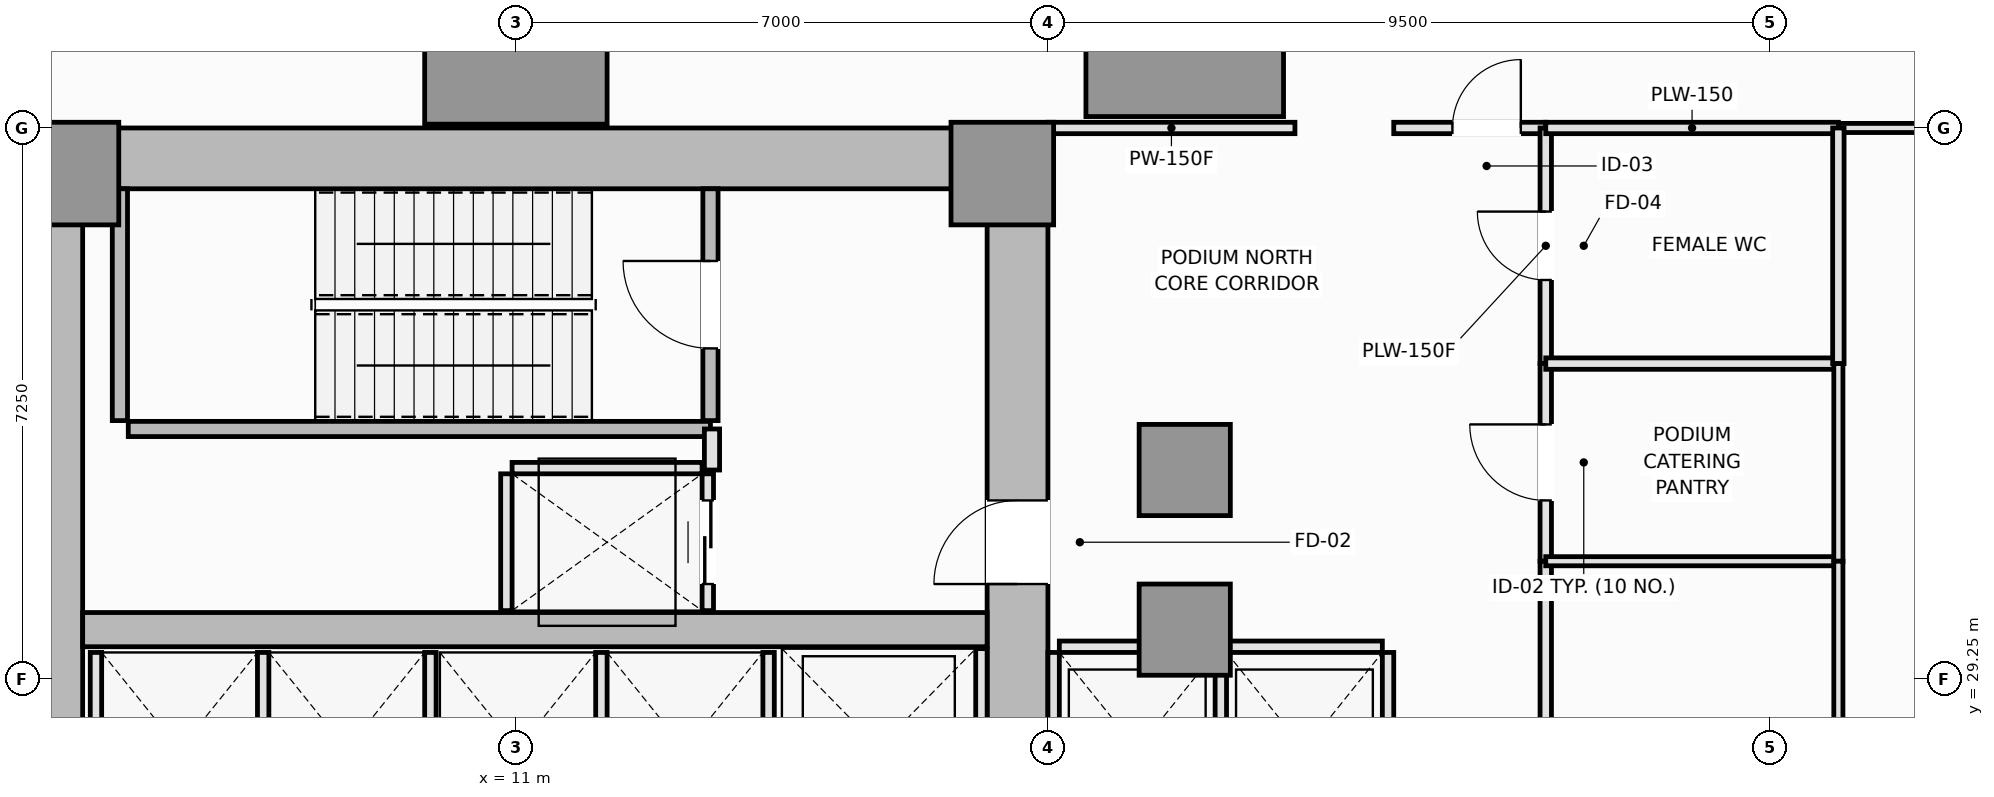
"""IFC4 building model, lengths in metres.
Left out: names, types, materials, properties, quantities, classifications, styles, units other than length and angle.
Written with IfcOpenShell. Run it as: python <this file> out.ifc"""

import sys

from ifc_helpers import new_model, si_unit, direction, frame, frame_2d, origin, origin_2d, place, context, subcontext, project, spatial, rectangle, extrude, element, fill, save


model = new_model("IFC4")
c1 = context("Model", 3, precision=1e-05, world=origin(), true_north=direction((0.0, 1.0)))
c2 = subcontext(c1, "Body", "Model", "MODEL_VIEW")
j1 = project(units=[si_unit("LENGTHUNIT", "METRE"), si_unit("PLANEANGLEUNIT", "RADIAN")], contexts=[c1])
p1 = place(None, origin())
s1 = spatial("IfcSite", under=j1, at=p1, CompositionType="ELEMENT")
p2 = place(p1, origin())
s2 = spatial("IfcBuilding", under=s1, at=p2, CompositionType="ELEMENT")
p3 = place(p2, frame((0.0, 0.0, 6.0)))
s3 = spatial("IfcBuildingStorey", under=s2, at=p3, CompositionType="ELEMENT", Elevation=6.0)
p4 = place(p3, frame((4.5, 36.1, 0.0), z_axis=(0.0, 0.0, 1.0), x_axis=(1.0, 0.0, 0.0)))
e1 = element("IfcWall", 1, at=p4, inside=s3, PredefinedType="SHEAR", context=c2, shape_type="SweptSolid", body=[
    extrude(rectangle(XDim=13.5, YDim=0.8, at=frame_2d((6.75, 0.0))), origin(), (0.0, 0.0, 1.0), 4.8),
])
p5 = place(p3, frame((4.9, 14.8, 0.0), z_axis=(0.0, 0.0, 1.0), x_axis=(0.0, 1.0, 0.0)))
e2 = element("IfcWall", 2, at=p5, inside=s3, PredefinedType="SHEAR", context=c2, shape_type="SweptSolid", body=[
    extrude(rectangle(XDim=20.9, YDim=0.8, at=frame_2d((10.45, 0.0))), origin(), (0.0, 0.0, 1.0), 4.8),
])
p6 = place(p3, frame((17.6, 27.05, 0.0), z_axis=(0.0, 0.0, 1.0), x_axis=(0.0, 1.0, 0.0)))
e3 = element("IfcWall", 3, at=p6, inside=s3, PredefinedType="SHEAR", context=c2, shape_type="SweptSolid", body=[
    extrude(rectangle(XDim=8.65, YDim=0.8, at=frame_2d((4.325, 0.0))), origin(), (0.0, 0.0, 1.0), 4.8),
])
p7 = place(p6, frame((3.45, 0.0, 0.0)))
e4 = element("IfcOpeningElement", 4, at=p7, cuts=e3, PredefinedType="OPENING", context=c2, shape_type="SweptSolid", body=[
    extrude(rectangle(XDim=1.1, YDim=2.15, at=frame_2d((0.55, 1.075))), frame((0.0, 0.41, 0.0), z_axis=(0.0, -1.0, 0.0), x_axis=(1.0, 0.0, 0.0)), (0.0, 0.0, 1.0), 0.82),
])
p8 = place(p3, frame((5.3, 29.9, 0.0), z_axis=(0.0, 0.0, 1.0), x_axis=(1.0, 0.0, 0.0)))
e5 = element("IfcWall", 5, at=p8, inside=s3, PredefinedType="SHEAR", context=c2, shape_type="SweptSolid", body=[
    extrude(rectangle(XDim=11.9, YDim=0.45, at=frame_2d((5.95, 0.0))), origin(), (0.0, 0.0, 1.0), 4.8),
])
for number, where, z_axis, x_axis in (
    (6, (5.1, 35.9, 0.0), (0.0, 0.0, 1.0), (1.0, 0.0, 0.0)),
    (7, (17.4, 35.9, 0.0), (0.0, 0.0, 1.0), (1.0, 0.0, 0.0)),
):
    element("IfcColumn", number, at=place(p3, frame(where, z_axis=z_axis, x_axis=x_axis)), inside=s3, PredefinedType="PILASTER", context=c2, shape_type="SweptSolid", body=[
        extrude(rectangle(XDim=1.35, YDim=1.35, at=origin_2d()), origin(), (0.0, 0.0, 1.0), 4.8),
    ])
p9 = place(p3, frame((11.0, 37.75, 0.0), z_axis=(0.0, 0.0, 1.0), x_axis=(1.0, 0.0, 0.0)))
e8 = element("IfcColumn", 8, at=p9, inside=s3, PredefinedType="COLUMN", context=c2, shape_type="SweptSolid", body=[
    extrude(rectangle(XDim=2.4, YDim=2.4, at=origin_2d()), origin(), (0.0, 0.0, 1.0), 4.8),
])
p10 = place(p3, frame((19.8, 37.75, 0.0), z_axis=(0.0, 0.0, 1.0), x_axis=(1.0, 0.0, 0.0)))
e9 = element("IfcColumn", 9, at=p10, inside=s3, PredefinedType="COLUMN", context=c2, shape_type="SweptSolid", body=[
    extrude(rectangle(XDim=2.6, YDim=2.2, at=origin_2d()), origin(), (0.0, 0.0, 1.0), 4.8),
])
for number, where, z_axis, x_axis in (
    (10, (19.8, 29.9, 0.0), (0.0, 0.0, 1.0), (1.0, 0.0, 0.0)),
    (11, (19.8, 32.0, 0.0), (0.0, 0.0, 1.0), (1.0, 0.0, 0.0)),
):
    element("IfcColumn", number, at=place(p3, frame(where, z_axis=z_axis, x_axis=x_axis)), inside=s3, PredefinedType="COLUMN", context=c2, shape_type="SweptSolid", body=[
        extrude(rectangle(XDim=1.2, YDim=1.2, at=origin_2d()), origin(), (0.0, 0.0, 1.0), 4.8),
    ])
p11 = place(p3, frame((5.79, 32.65, 0.0), z_axis=(0.0, 0.0, 1.0), x_axis=(0.0, 1.0, 0.0)))
e12 = element("IfcWall", 12, at=p11, inside=s3, PredefinedType="SOLIDWALL", context=c2, shape_type="SweptSolid", body=[
    extrude(rectangle(XDim=3.05, YDim=0.2, at=frame_2d((1.525, 0.0))), origin(), (0.0, 0.0, 1.0), 4.8),
])
p12 = place(p3, frame((5.9, 32.54, 0.0), z_axis=(0.0, 0.0, 1.0), x_axis=(1.0, 0.0, 0.0)))
e13 = element("IfcWall", 13, at=p12, inside=s3, PredefinedType="SOLIDWALL", context=c2, shape_type="SweptSolid", body=[
    extrude(rectangle(XDim=7.66, YDim=0.2, at=frame_2d((3.83, 0.0))), origin(), (0.0, 0.0, 1.0), 4.8),
])
p13 = place(p3, frame((13.56, 32.65, 0.0), z_axis=(0.0, 0.0, 1.0), x_axis=(0.0, 1.0, 0.0)))
e14 = element("IfcWall", 14, at=p13, inside=s3, PredefinedType="SOLIDWALL", context=c2, shape_type="SweptSolid", body=[
    extrude(rectangle(XDim=3.05, YDim=0.2, at=frame_2d((1.525, 0.0))), origin(), (0.0, 0.0, 1.0), 4.8),
])
p14 = place(p13, frame((0.95, 0.0, 0.0)))
e15 = element("IfcOpeningElement", 15, at=p14, cuts=e14, PredefinedType="OPENING", context=c2, shape_type="SweptSolid", body=[
    extrude(rectangle(XDim=1.15, YDim=2.15, at=frame_2d((0.575, 1.075))), frame((0.0, 0.11, 0.0), z_axis=(0.0, -1.0, 0.0), x_axis=(1.0, 0.0, 0.0)), (0.0, 0.0, 1.0), 0.22),
])
p15 = place(p3, frame((18.15, 29.675, 0.0), z_axis=(0.0, 0.0, 1.0), x_axis=(1.0, 0.0, 0.0)))
e16 = element("IfcWall", 16, at=p15, inside=s3, PredefinedType="PARTITIONING", context=c2, shape_type="SweptSolid", body=[
    extrude(rectangle(XDim=2.05, YDim=0.15, at=frame_2d((1.025, 0.0))), origin(), (0.0, 0.0, 1.0), 4.6),
])
for number, where, z_axis, x_axis in (
    (17, (18.075, 27.05, 0.0), (0.0, 0.0, 1.0), (0.0, 1.0, 0.0)),
    (18, (20.275, 27.05, 0.0), (0.0, 0.0, 1.0), (0.0, 1.0, 0.0)),
):
    element("IfcWall", number, at=place(p3, frame(where, z_axis=z_axis, x_axis=x_axis)), inside=s3, PredefinedType="PARTITIONING", context=c2, shape_type="SweptSolid", body=[
        extrude(rectangle(XDim=2.55, YDim=0.15, at=frame_2d((1.275, 0.0))), origin(), (0.0, 0.0, 1.0), 4.6),
    ])
p16 = place(p3, frame((20.35, 29.675, 0.0), z_axis=(0.0, 0.0, 1.0), x_axis=(1.0, 0.0, 0.0)))
e19 = element("IfcWall", 19, at=p16, inside=s3, PredefinedType="PARTITIONING", context=c2, shape_type="SweptSolid", body=[
    extrude(rectangle(XDim=2.05, YDim=0.15, at=frame_2d((1.025, 0.0))), origin(), (0.0, 0.0, 1.0), 4.6),
])
for number, where, z_axis, x_axis in (
    (20, (22.475, 27.05, 0.0), (0.0, 0.0, 1.0), (0.0, 1.0, 0.0)),
    (21, (5.475, 27.05, 0.0), (0.0, 0.0, 1.0), (0.0, 1.0, 0.0)),
    (22, (7.675, 27.05, 0.0), (0.0, 0.0, 1.0), (0.0, 1.0, 0.0)),
    (23, (9.875, 27.05, 0.0), (0.0, 0.0, 1.0), (0.0, 1.0, 0.0)),
    (24, (12.125, 27.05, 0.0), (0.0, 0.0, 1.0), (0.0, 1.0, 0.0)),
    (25, (14.325, 27.05, 0.0), (0.0, 0.0, 1.0), (0.0, 1.0, 0.0)),
):
    element("IfcWall", number, at=place(p3, frame(where, z_axis=z_axis, x_axis=x_axis)), inside=s3, PredefinedType="PARTITIONING", context=c2, shape_type="SweptSolid", body=[
        extrude(rectangle(XDim=2.55, YDim=0.15, at=frame_2d((1.275, 0.0))), origin(), (0.0, 0.0, 1.0), 4.6),
    ])
p17 = place(p3, frame((17.125, 27.05, 0.0), z_axis=(0.0, 0.0, 1.0), x_axis=(0.0, 1.0, 0.0)))
e26 = element("IfcWall", 26, at=p17, inside=s3, PredefinedType="PARTITIONING", context=c2, shape_type="SweptSolid", body=[
    extrude(rectangle(XDim=2.6, YDim=0.15, at=frame_2d((1.3, 0.0))), origin(), (0.0, 0.0, 1.0), 4.6),
])
p18 = place(p3, frame((10.95, 32.025, 0.0), z_axis=(0.0, 0.0, 1.0), x_axis=(1.0, 0.0, 0.0)))
e27 = element("IfcWall", 27, at=p18, inside=s3, PredefinedType="PARTITIONING", context=c2, shape_type="SweptSolid", body=[
    extrude(rectangle(XDim=2.5, YDim=0.15, at=frame_2d((1.25, 0.0))), origin(), (0.0, 0.0, 1.0), 4.6),
])
p19 = place(p3, frame((10.875, 30.15, 0.0), z_axis=(0.0, 0.0, 1.0), x_axis=(0.0, 1.0, 0.0)))
e28 = element("IfcWall", 28, at=p19, inside=s3, PredefinedType="PARTITIONING", context=c2, shape_type="SweptSolid", body=[
    extrude(rectangle(XDim=1.8, YDim=0.15, at=frame_2d((0.9, 0.0))), origin(), (0.0, 0.0, 1.0), 4.6),
])
p20 = place(p3, frame((13.525, 30.15, 0.0), z_axis=(0.0, 0.0, 1.0), x_axis=(0.0, 1.0, 0.0)))
e29 = element("IfcWall", 29, at=p20, inside=s3, PredefinedType="PARTITIONING", context=c2, shape_type="SweptSolid", body=[
    extrude(rectangle(XDim=1.8, YDim=0.15, at=frame_2d((0.9, 0.0))), origin(), (0.0, 0.0, 1.0), 4.6),
])
p21 = place(p20, frame((0.35, 0.0, 0.0)))
e30 = element("IfcOpeningElement", 30, at=p21, cuts=e29, PredefinedType="OPENING", context=c2, shape_type="SweptSolid", body=[
    extrude(rectangle(XDim=1.1, YDim=2.2, at=frame_2d((0.55, 1.1))), frame((0.0, 0.085, 0.0), z_axis=(0.0, -1.0, 0.0), x_axis=(1.0, 0.0, 0.0)), (0.0, 0.0, 1.0), 0.17),
])
p22 = place(p3, frame((13.58, 32.0, 0.0), z_axis=(0.0, 0.0, 1.0), x_axis=(0.0, 1.0, 0.0)))
e31 = element("IfcWall", 31, at=p22, inside=s3, PredefinedType="PARTITIONING", context=c2, shape_type="SweptSolid", body=[
    extrude(rectangle(XDim=0.54, YDim=0.2, at=frame_2d((0.27, 0.0))), origin(), (0.0, 0.0, 1.0), 4.6),
])
p23 = place(p3, frame((18.0, 36.5, 0.0), z_axis=(0.0, 0.0, 1.0), x_axis=(1.0, 0.0, 0.0)))
e32 = element("IfcWall", 32, at=p23, inside=s3, PredefinedType="PARTITIONING", context=c2, shape_type="SweptSolid", body=[
    extrude(rectangle(XDim=3.25, YDim=0.15, at=frame_2d((1.625, 0.0))), origin(), (0.0, 0.0, 1.0), 4.6),
])
p24 = place(p3, frame((22.55, 36.5, 0.0), z_axis=(0.0, 0.0, 1.0), x_axis=(1.0, 0.0, 0.0)))
e33 = element("IfcWall", 33, at=p24, inside=s3, PredefinedType="PARTITIONING", context=c2, shape_type="SweptSolid", body=[
    extrude(rectangle(XDim=2.0, YDim=0.15, at=frame_2d((1.0, 0.0))), origin(), (0.0, 0.0, 1.0), 4.6),
])
p25 = place(p24, frame((0.772, 0.0, 0.0)))
e34 = element("IfcOpeningElement", 34, at=p25, cuts=e33, PredefinedType="OPENING", context=c2, shape_type="SweptSolid", body=[
    extrude(rectangle(XDim=0.9, YDim=2.1, at=frame_2d((0.45, 1.05))), frame((0.0, 0.085, 0.0), z_axis=(0.0, -1.0, 0.0), x_axis=(1.0, 0.0, 0.0)), (0.0, 0.0, 1.0), 0.17),
])
p26 = place(p3, frame((24.55, 33.4, 0.0), z_axis=(0.0, 0.0, 1.0), x_axis=(0.0, 1.0, 0.0)))
e35 = element("IfcWall", 35, at=p26, inside=s3, PredefinedType="PLUMBINGWALL", context=c2, shape_type="SweptSolid", body=[
    extrude(rectangle(XDim=3.1, YDim=0.15, at=frame_2d((1.55, 0.0))), origin(), (0.0, 0.0, 1.0), 4.6),
])
p27 = place(p26, frame((1.1, 0.0, 0.0)))
e36 = element("IfcOpeningElement", 36, at=p27, cuts=e35, PredefinedType="OPENING", context=c2, shape_type="SweptSolid", body=[
    extrude(rectangle(XDim=0.9, YDim=2.1, at=frame_2d((0.45, 1.05))), frame((0.0, 0.085, 0.0), z_axis=(0.0, -1.0, 0.0), x_axis=(1.0, 0.0, 0.0)), (0.0, 0.0, 1.0), 0.17),
])
p28 = place(p3, frame((24.55, 30.8, 0.0), z_axis=(0.0, 0.0, 1.0), x_axis=(0.0, 1.0, 0.0)))
e37 = element("IfcWall", 37, at=p28, inside=s3, PredefinedType="PARTITIONING", context=c2, shape_type="SweptSolid", body=[
    extrude(rectangle(XDim=2.6, YDim=0.15, at=frame_2d((1.3, 0.0))), origin(), (0.0, 0.0, 1.0), 4.6),
])
p29 = place(p28, frame((0.8, 0.0, 0.0)))
e38 = element("IfcOpeningElement", 38, at=p29, cuts=e37, PredefinedType="OPENING", context=c2, shape_type="SweptSolid", body=[
    extrude(rectangle(XDim=1.0, YDim=2.15, at=frame_2d((0.5, 1.075))), frame((0.0, 0.085, 0.0), z_axis=(0.0, -1.0, 0.0), x_axis=(1.0, 0.0, 0.0)), (0.0, 0.0, 1.0), 0.17),
])
p30 = place(p3, frame((24.55, 21.7, 0.0), z_axis=(0.0, 0.0, 1.0), x_axis=(0.0, 1.0, 0.0)))
e39 = element("IfcWall", 39, at=p30, inside=s3, PredefinedType="PARTITIONING", context=c2, shape_type="SweptSolid", body=[
    extrude(rectangle(XDim=9.1, YDim=0.15, at=frame_2d((4.55, 0.0))), origin(), (0.0, 0.0, 1.0), 4.6),
])
p31 = place(p30, frame((4.05, 0.0, 0.0)))
e40 = element("IfcOpeningElement", 40, at=p31, cuts=e39, PredefinedType="OPENING", context=c2, shape_type="SweptSolid", body=[
    extrude(rectangle(XDim=1.0, YDim=2.15, at=frame_2d((0.5, 1.075))), frame((0.0, 0.085, 0.0), z_axis=(0.0, -1.0, 0.0), x_axis=(1.0, 0.0, 0.0)), (0.0, 0.0, 1.0), 0.17),
])
p32 = place(p3, frame((24.55, 36.5, 0.0), z_axis=(0.0, 0.0, 1.0), x_axis=(1.0, 0.0, 0.0)))
e41 = element("IfcWall", 41, at=p32, inside=s3, PredefinedType="PLUMBINGWALL", context=c2, shape_type="SweptSolid", body=[
    extrude(rectangle(XDim=3.85, YDim=0.15, at=frame_2d((1.925, 0.0))), origin(), (0.0, 0.0, 1.0), 4.6),
])
p33 = place(p3, frame((28.4, 36.5, 0.0), z_axis=(0.0, 0.0, 1.0), x_axis=(1.0, 0.0, 0.0)))
e42 = element("IfcWall", 42, at=p33, inside=s3, PredefinedType="PARTITIONING", context=c2, shape_type="SweptSolid", body=[
    extrude(rectangle(XDim=4.8, YDim=0.12, at=frame_2d((2.4, 0.0))), origin(), (0.0, 0.0, 1.0), 4.6),
])
p34 = place(p3, frame((24.55, 33.4, 0.0), z_axis=(0.0, 0.0, 1.0), x_axis=(1.0, 0.0, 0.0)))
e43 = element("IfcWall", 43, at=p34, inside=s3, PredefinedType="PLUMBINGWALL", context=c2, shape_type="SweptSolid", body=[
    extrude(rectangle(XDim=3.85, YDim=0.15, at=frame_2d((1.925, 0.0))), origin(), (0.0, 0.0, 1.0), 4.6),
])
p35 = place(p3, frame((28.4, 33.4, 0.0), z_axis=(0.0, 0.0, 1.0), x_axis=(0.0, 1.0, 0.0)))
e44 = element("IfcWall", 44, at=p35, inside=s3, PredefinedType="PLUMBINGWALL", context=c2, shape_type="SweptSolid", body=[
    extrude(rectangle(XDim=3.1, YDim=0.15, at=frame_2d((1.55, 0.0))), origin(), (0.0, 0.0, 1.0), 4.6),
])
p36 = place(p3, frame((24.55, 30.8, 0.0), z_axis=(0.0, 0.0, 1.0), x_axis=(1.0, 0.0, 0.0)))
e45 = element("IfcWall", 45, at=p36, inside=s3, PredefinedType="PARTITIONING", context=c2, shape_type="SweptSolid", body=[
    extrude(rectangle(XDim=3.85, YDim=0.12, at=frame_2d((1.925, 0.0))), origin(), (0.0, 0.0, 1.0), 4.6),
])
p37 = place(p3, frame((28.4, 30.8, 0.0), z_axis=(0.0, 0.0, 1.0), x_axis=(0.0, 1.0, 0.0)))
e46 = element("IfcWall", 46, at=p37, inside=s3, PredefinedType="PARTITIONING", context=c2, shape_type="SweptSolid", body=[
    extrude(rectangle(XDim=2.6, YDim=0.12, at=frame_2d((1.3, 0.0))), origin(), (0.0, 0.0, 1.0), 4.6),
])
p38 = place(p3, frame((28.4, 21.7, 0.0), z_axis=(0.0, 0.0, 1.0), x_axis=(0.0, 1.0, 0.0)))
e47 = element("IfcWall", 47, at=p38, inside=s3, PredefinedType="PARTITIONING", context=c2, shape_type="SweptSolid", body=[
    extrude(rectangle(XDim=9.1, YDim=0.12, at=frame_2d((4.55, 0.0))), origin(), (0.0, 0.0, 1.0), 4.6),
])
p39 = place(p14, origin())
e48 = element("IfcDoor", 48, at=p39, inside=s3, OperationType="SINGLE_SWING_RIGHT", PredefinedType="DOOR", context=c2, shape_type="SweptSolid", body=[
    extrude(rectangle(XDim=1.15, YDim=2.15, at=frame_2d((0.575, 1.075))), frame((0.0, 0.025, 0.0), z_axis=(0.0, -1.0, 0.0), x_axis=(1.0, 0.0, 0.0)), (0.0, 0.0, 1.0), 0.05),
])
fill(e15, e48)
p40 = place(p21, origin())
e49 = element("IfcDoor", 49, at=p40, inside=s3, OperationType="DOUBLE_DOOR_SLIDING", PredefinedType="DOOR", context=c2, shape_type="SweptSolid", body=[
    extrude(rectangle(XDim=1.1, YDim=2.2, at=frame_2d((0.55, 1.1))), frame((0.0, 0.025, 0.0), z_axis=(0.0, -1.0, 0.0), x_axis=(1.0, 0.0, 0.0)), (0.0, 0.0, 1.0), 0.05),
])
fill(e30, e49)
p41 = place(p7, origin())
e50 = element("IfcDoor", 50, at=p41, inside=s3, OperationType="SINGLE_SWING_LEFT", PredefinedType="DOOR", context=c2, shape_type="SweptSolid", body=[
    extrude(rectangle(XDim=1.1, YDim=2.15, at=frame_2d((0.55, 1.075))), frame((0.0, 0.025, 0.0), z_axis=(0.0, -1.0, 0.0), x_axis=(1.0, 0.0, 0.0)), (0.0, 0.0, 1.0), 0.05),
])
fill(e4, e50)
p42 = place(p25, origin())
e51 = element("IfcDoor", 51, at=p42, inside=s3, OperationType="SINGLE_SWING_RIGHT", PredefinedType="DOOR", context=c2, shape_type="SweptSolid", body=[
    extrude(rectangle(XDim=0.9, YDim=2.1, at=frame_2d((0.45, 1.05))), frame((0.0, 0.025, 0.0), z_axis=(0.0, -1.0, 0.0), x_axis=(1.0, 0.0, 0.0)), (0.0, 0.0, 1.0), 0.05),
])
fill(e34, e51)
p43 = place(p27, origin())
e52 = element("IfcDoor", 52, at=p43, inside=s3, OperationType="SINGLE_SWING_RIGHT", PredefinedType="DOOR", context=c2, shape_type="SweptSolid", body=[
    extrude(rectangle(XDim=0.9, YDim=2.1, at=frame_2d((0.45, 1.05))), frame((0.0, 0.025, 0.0), z_axis=(0.0, -1.0, 0.0), x_axis=(1.0, 0.0, 0.0)), (0.0, 0.0, 1.0), 0.05),
])
fill(e36, e52)
p44 = place(p29, origin())
e53 = element("IfcDoor", 53, at=p44, inside=s3, OperationType="SINGLE_SWING_RIGHT", PredefinedType="DOOR", context=c2, shape_type="SweptSolid", body=[
    extrude(rectangle(XDim=1.0, YDim=2.15, at=frame_2d((0.5, 1.075))), frame((0.0, 0.025, 0.0), z_axis=(0.0, -1.0, 0.0), x_axis=(1.0, 0.0, 0.0)), (0.0, 0.0, 1.0), 0.05),
])
fill(e38, e53)
save(model, sys.argv[1])
